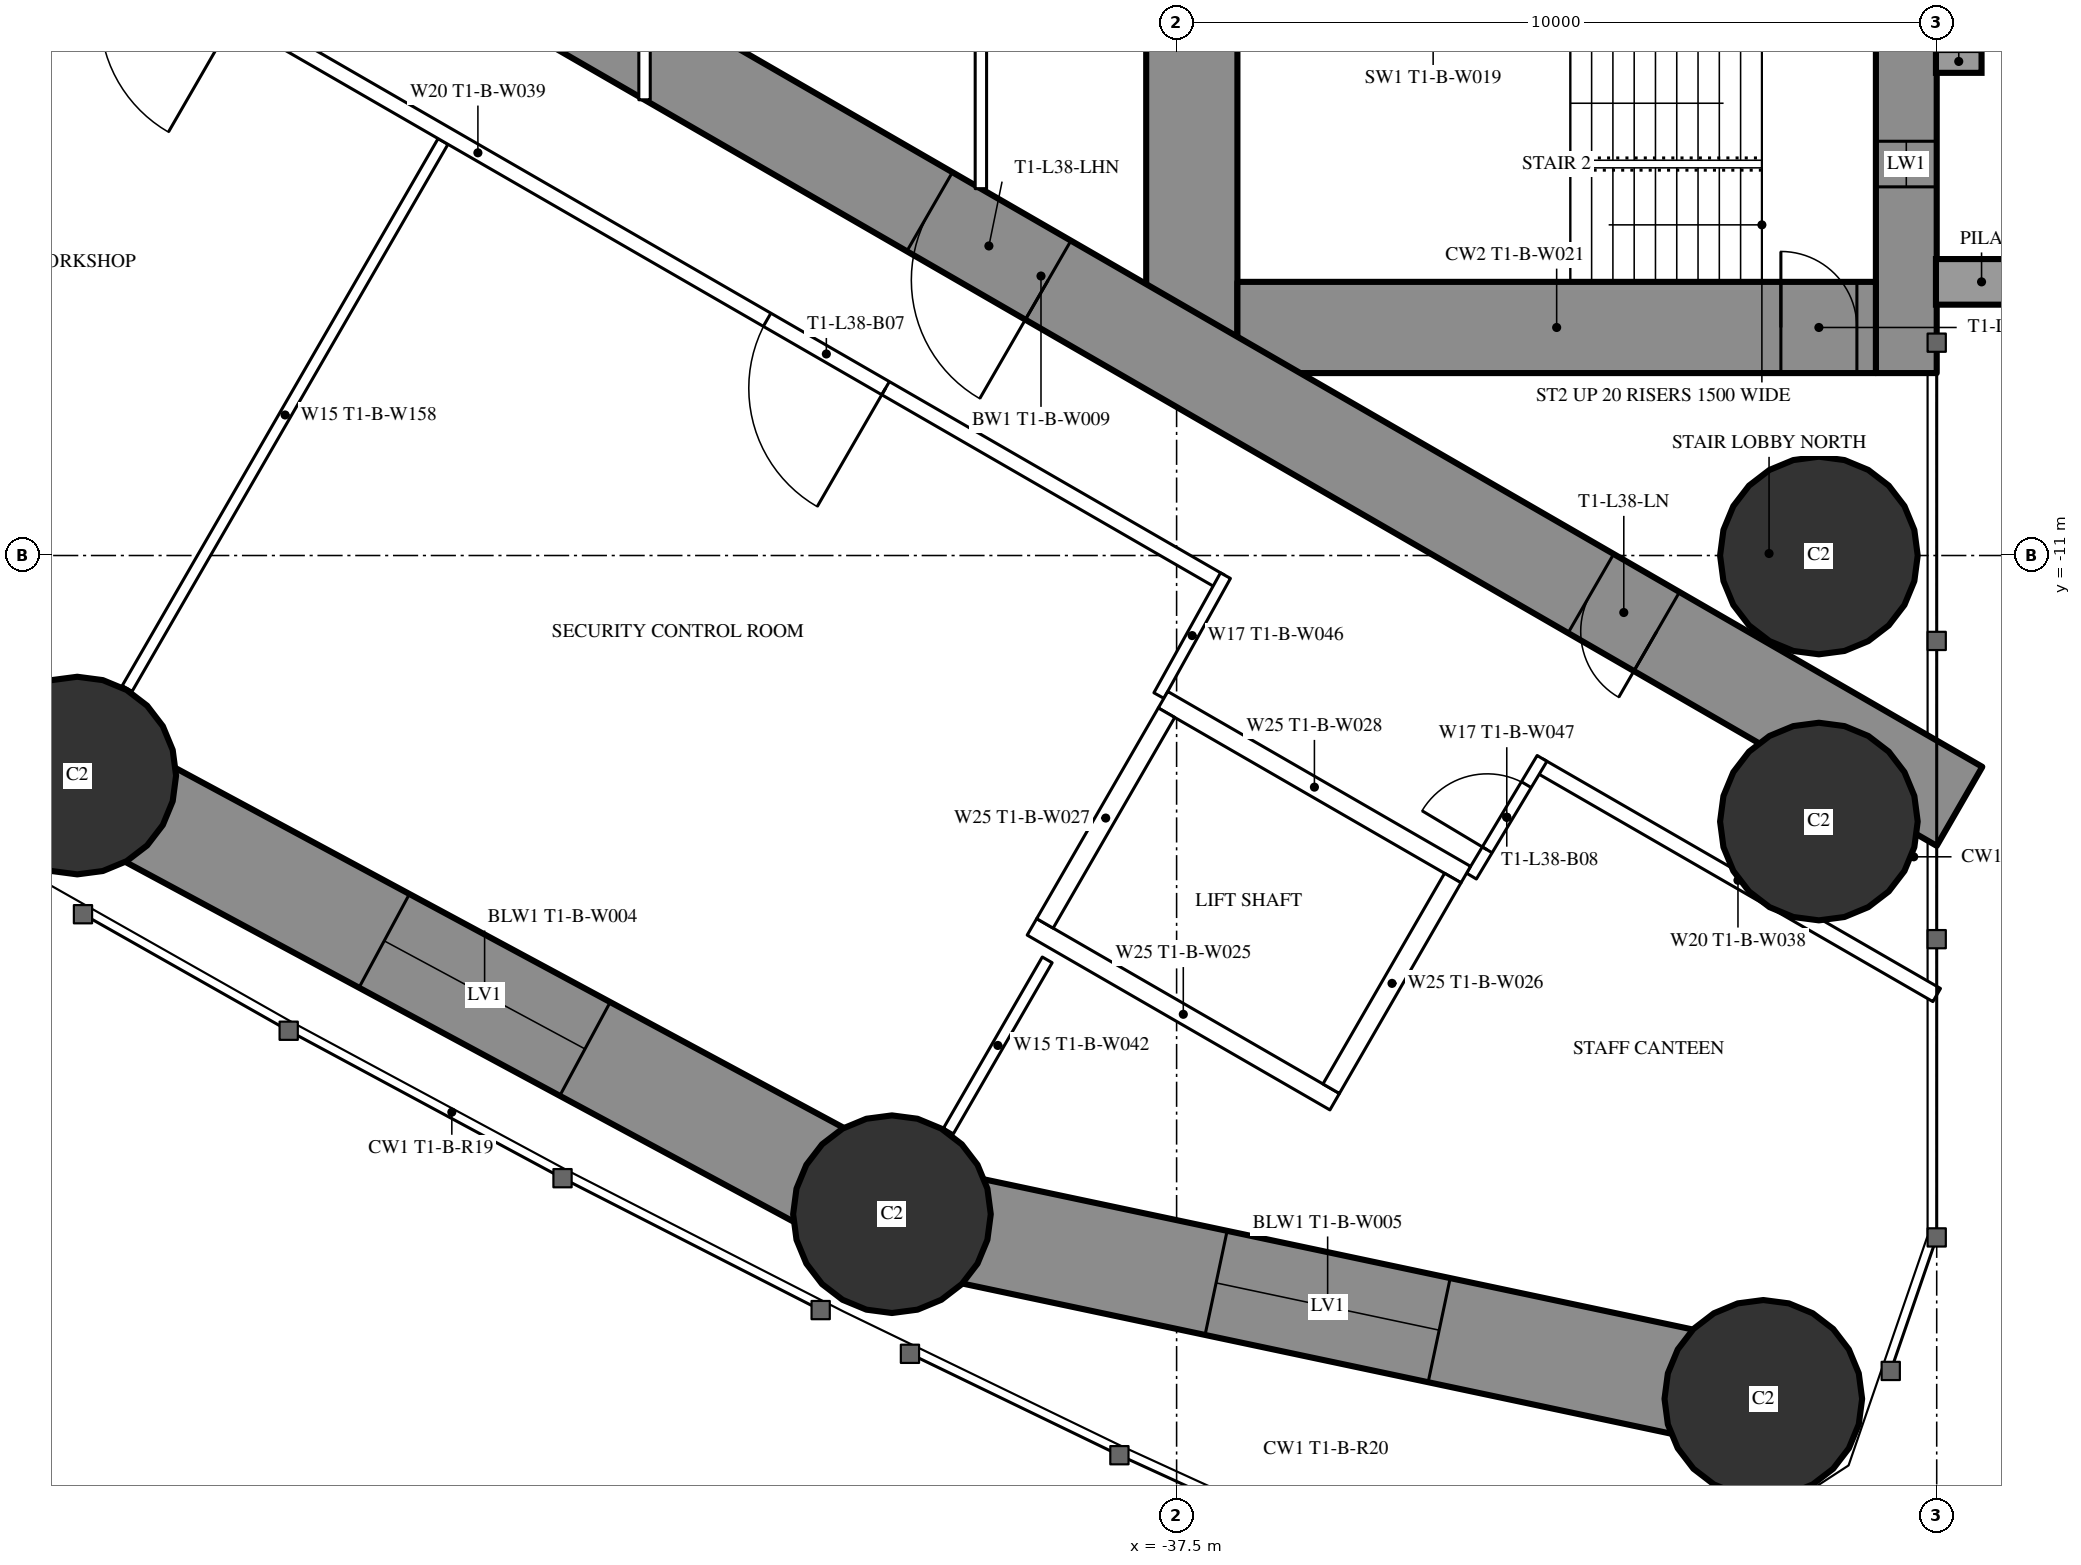
"""IFC4 building model, lengths in metres.
Left out: names, types, materials, properties, quantities, classifications, styles, units other than length and angle.
Written with IfcOpenShell. Run it as: python <this file> out.ifc"""

import sys

from ifc_helpers import new_model, si_unit, direction, frame, frame_2d, origin, origin_2d, place, context, subcontext, project, spatial, rectangle, hollow_circle, extrude, element, fill, save


model = new_model("IFC4")
c1 = context("Model", 3, precision=1e-05, world=origin(), true_north=direction((0.0, 1.0)))
c2 = subcontext(c1, "Body", "Model", "MODEL_VIEW")
j1 = project(units=[si_unit("LENGTHUNIT", "METRE"), si_unit("PLANEANGLEUNIT", "RADIAN")], contexts=[c1])
p1 = place(None, origin())
s1 = spatial("IfcSite", under=j1, at=p1, CompositionType="ELEMENT")
p2 = place(p1, origin())
s2 = spatial("IfcBuilding", under=s1, at=p2, CompositionType="ELEMENT")
p3 = place(p2, frame((0.0, 0.0, 143.1)))
s3 = spatial("IfcBuildingStorey", under=s2, at=p3, CompositionType="ELEMENT", Elevation=143.1)
for number, where, z_axis, x_axis in (
    (1, (-29.781, -22.095, 0.0), (0.0, 0.0, 1.0), (1.0, 0.0, 0.0)),
    (2, (-29.05, -11.0, 0.0), (0.0, 0.0, 1.0), (1.0, 0.0, 0.0)),
    (3, (-29.05, -14.5, 0.0), (0.0, 0.0, 1.0), (1.0, 0.0, 0.0)),
    (4, (-51.963, -13.895, 0.0), (0.0, 0.0, 1.0), (1.0, 0.0, 0.0)),
    (5, (-41.245, -19.666, 0.0), (0.0, 0.0, 1.0), (1.0, 0.0, 0.0)),
):
    element("IfcColumn", number, at=place(p3, frame(where, z_axis=z_axis, x_axis=x_axis)), inside=s3, PredefinedType="COLUMN", context=c2, shape_type="SweptSolid", body=[
        extrude(hollow_circle(Radius=1.3, WallThickness=0.1, at=origin_2d()), origin(), (0.0, 0.0, 1.0), 3.6),
    ])
p4 = place(p3, frame((-27.9, 8.6, 0.0), z_axis=(0.0, 0.0, 1.0), x_axis=(0.0, -1.0, 0.0)))
e6 = element("IfcWall", 6, at=p4, inside=s3, PredefinedType="SHEAR", context=c2, shape_type="SweptSolid", body=[
    extrude(rectangle(XDim=17.2, YDim=0.8, at=frame_2d((8.6, 0.0))), origin(), (0.0, 0.0, 1.0), 3.6),
])
p5 = place(p4, frame((2.45, 0.0, 0.6)))
e7 = element("IfcOpeningElement", 7, at=p5, cuts=e6, PredefinedType="OPENING", context=c2, shape_type="SweptSolid", body=[
    extrude(rectangle(XDim=0.6, YDim=2.1, at=frame_2d((0.3, 1.05))), frame((0.0, 0.41, 0.0), z_axis=(0.0, -1.0, 0.0), x_axis=(1.0, 0.0, 0.0)), (0.0, 0.0, 1.0), 0.82),
])
p6 = place(p4, frame((14.15, 0.0, 0.6)))
e8 = element("IfcOpeningElement", 8, at=p6, cuts=e6, PredefinedType="OPENING", context=c2, shape_type="SweptSolid", body=[
    extrude(rectangle(XDim=0.6, YDim=2.1, at=frame_2d((0.3, 1.05))), frame((0.0, 0.41, 0.0), z_axis=(0.0, -1.0, 0.0), x_axis=(1.0, 0.0, 0.0)), (0.0, 0.0, 1.0), 0.82),
])
p7 = place(p3, frame((-37.3, 8.6, 0.0), z_axis=(0.0, 0.0, 1.0), x_axis=(0.0, -1.0, 0.0)))
e9 = element("IfcWall", 9, at=p7, inside=s3, PredefinedType="SHEAR", context=c2, shape_type="SweptSolid", body=[
    extrude(rectangle(XDim=17.2, YDim=1.2, at=frame_2d((8.6, 0.0))), origin(), (0.0, 0.0, 1.0), 3.6),
])
p8 = place(p7, frame((7.7, 0.0, 0.0)))
e10 = element("IfcOpeningElement", 10, at=p8, cuts=e9, PredefinedType="OPENING", context=c2, shape_type="SweptSolid", body=[
    extrude(rectangle(XDim=1.8, YDim=2.2, at=frame_2d((0.9, 1.1))), frame((0.0, 0.61, 0.0), z_axis=(0.0, -1.0, 0.0), x_axis=(1.0, 0.0, 0.0)), (0.0, 0.0, 1.0), 1.22),
])
p9 = place(p3, frame((-28.3, -8.0, 0.0), z_axis=(0.0, 0.0, 1.0), x_axis=(-1.0, 0.0, 0.0)))
e11 = element("IfcWall", 11, at=p9, inside=s3, PredefinedType="SHEAR", context=c2, shape_type="SweptSolid", body=[
    extrude(rectangle(XDim=8.4, YDim=1.2, at=frame_2d((4.2, 0.0))), origin(), (0.0, 0.0, 1.0), 3.6),
])
p10 = place(p9, frame((0.25, 0.0, 0.0)))
e12 = element("IfcOpeningElement", 12, at=p10, cuts=e11, PredefinedType="OPENING", context=c2, shape_type="SweptSolid", body=[
    extrude(rectangle(XDim=1.0, YDim=2.2, at=frame_2d((0.5, 1.1))), frame((0.0, 0.61, 0.0), z_axis=(0.0, -1.0, 0.0), x_axis=(1.0, 0.0, 0.0)), (0.0, 0.0, 1.0), 1.22),
])
p11 = place(p3, frame((-27.2, -14.3, 0.0), z_axis=(0.0, 0.0, 1.0), x_axis=(-0.866024021859, 0.500002393557, 0.0)))
e13 = element("IfcWall", 13, at=p11, inside=s3, PredefinedType="SHEAR", context=c2, shape_type="SweptSolid", body=[
    extrude(rectangle(XDim=27.907, YDim=1.2, at=frame_2d((13.954, 0.0))), origin(), (0.0, 0.0, 1.0), 3.6),
])
p12 = place(p11, frame((4.6, 0.0, 0.0)))
e14 = element("IfcOpeningElement", 14, at=p12, cuts=e13, PredefinedType="OPENING", context=c2, shape_type="SweptSolid", body=[
    extrude(rectangle(XDim=1.0, YDim=2.2, at=frame_2d((0.5, 1.1))), frame((0.0, 0.61, 0.0), z_axis=(0.0, -1.0, 0.0), x_axis=(1.0, 0.0, 0.0)), (0.0, 0.0, 1.0), 1.22),
])
p13 = place(p11, frame((13.845, 0.0, 0.0)))
e15 = element("IfcOpeningElement", 15, at=p13, cuts=e13, PredefinedType="OPENING", context=c2, shape_type="SweptSolid", body=[
    extrude(rectangle(XDim=1.8, YDim=2.2, at=frame_2d((0.9, 1.1))), frame((0.0, 0.61, 0.0), z_axis=(0.0, -1.0, 0.0), x_axis=(1.0, 0.0, 0.0)), (0.0, 0.0, 1.0), 1.22),
])
p14 = place(p3, frame((-62.287, -7.445, 0.0), z_axis=(0.0, 0.0, 1.0), x_axis=(0.848062521637, -0.529896177939, 0.0)))
e16 = element("IfcWall", 16, at=p14, inside=s3, PredefinedType="SHEAR", context=c2, shape_type="SweptSolid", body=[
    extrude(rectangle(XDim=12.173, YDim=1.4, at=frame_2d((6.086, 0.0))), origin(), (0.0, 0.0, 1.0), 3.6),
])
p15 = place(p14, frame((4.586, 0.0, 0.6)))
e17 = element("IfcOpeningElement", 17, at=p15, cuts=e16, PredefinedType="OPENING", context=c2, shape_type="SweptSolid", body=[
    extrude(rectangle(XDim=3.0, YDim=1.2, at=frame_2d((1.5, 0.6))), frame((0.0, 0.71, 0.0), z_axis=(0.0, -1.0, 0.0), x_axis=(1.0, 0.0, 0.0)), (0.0, 0.0, 1.0), 1.42),
])
p16 = place(p3, frame((-51.963, -13.895, 0.0), z_axis=(0.0, 0.0, 1.0), x_axis=(0.880492350889, -0.474060354835, 0.0)))
e18 = element("IfcWall", 18, at=p16, inside=s3, PredefinedType="SHEAR", context=c2, shape_type="SweptSolid", body=[
    extrude(rectangle(XDim=12.173, YDim=1.4, at=frame_2d((6.086, 0.0))), origin(), (0.0, 0.0, 1.0), 3.6),
])
p17 = place(p16, frame((4.586, 0.0, 0.6)))
e19 = element("IfcOpeningElement", 19, at=p17, cuts=e18, PredefinedType="OPENING", context=c2, shape_type="SweptSolid", body=[
    extrude(rectangle(XDim=3.0, YDim=1.2, at=frame_2d((1.5, 0.6))), frame((0.0, 0.71, 0.0), z_axis=(0.0, -1.0, 0.0), x_axis=(1.0, 0.0, 0.0)), (0.0, 0.0, 1.0), 1.42),
])
p18 = place(p3, frame((-41.245, -19.666, 0.0), z_axis=(0.0, 0.0, 1.0), x_axis=(0.978282156247, -0.207277646573, 0.0)))
e20 = element("IfcWall", 20, at=p18, inside=s3, PredefinedType="SHEAR", context=c2, shape_type="SweptSolid", body=[
    extrude(rectangle(XDim=11.718, YDim=1.4, at=frame_2d((5.859, 0.0))), origin(), (0.0, 0.0, 1.0), 3.6),
])
p19 = place(p18, frame((4.359, 0.0, 0.6)))
e21 = element("IfcOpeningElement", 21, at=p19, cuts=e20, PredefinedType="OPENING", context=c2, shape_type="SweptSolid", body=[
    extrude(rectangle(XDim=3.0, YDim=1.2, at=frame_2d((1.5, 0.6))), frame((0.0, 0.71, 0.0), z_axis=(0.0, -1.0, 0.0), x_axis=(1.0, 0.0, 0.0)), (0.0, 0.0, 1.0), 1.42),
])
p20 = place(p3, frame((-47.151, -5.552, 0.0), z_axis=(0.0, 0.0, 1.0), x_axis=(-0.500003012045, -0.866023664773, 0.0)))
e22 = element("IfcWall", 22, at=p20, inside=s3, PredefinedType="PARTITIONING", context=c2, shape_type="SweptSolid", body=[
    extrude(rectangle(XDim=8.311, YDim=0.15, at=frame_2d((4.156, 0.0))), origin(), (0.0, 0.0, 1.0), 2.15),
])
p21 = place(p3, frame((-39.202, -16.32, 0.0), z_axis=(0.0, 0.0, 1.0), x_axis=(-0.49997716683, -0.86603858612, 0.0)))
e23 = element("IfcWall", 23, at=p21, inside=s3, PredefinedType="PARTITIONING", context=c2, shape_type="SweptSolid", body=[
    extrude(rectangle(XDim=2.6, YDim=0.15, at=frame_2d((1.3, 0.0))), origin(), (0.0, 0.0, 1.0), 3.35),
])
p22 = place(p3, frame((-27.5, -16.782, 0.0), z_axis=(0.0, 0.0, 1.0), x_axis=(-0.866030050624, 0.499991951352, 0.0)))
e24 = element("IfcWall", 24, at=p22, inside=s3, PredefinedType="PARTITIONING", context=c2, shape_type="SweptSolid", body=[
    extrude(rectangle(XDim=6.038, YDim=0.2, at=frame_2d((3.019, 0.0))), origin(), (0.0, 0.0, 1.0), 3.35),
])
p23 = place(p3, frame((-36.92, -11.344, 0.0), z_axis=(0.0, 0.0, 1.0), x_axis=(-0.866028313256, 0.499994960614, 0.0)))
e25 = element("IfcWall", 25, at=p23, inside=s3, PredefinedType="PARTITIONING", context=c2, shape_type="SweptSolid", body=[
    extrude(rectangle(XDim=22.568, YDim=0.2, at=frame_2d((11.284, 0.0))), origin(), (0.0, 0.0, 1.0), 3.35),
])
p24 = place(p23, frame((20.24, 0.0, 0.0)))
e26 = element("IfcOpeningElement", 26, at=p24, cuts=e25, PredefinedType="OPENING", context=c2, shape_type="SweptSolid", body=[
    extrude(rectangle(XDim=1.8, YDim=2.14, at=frame_2d((0.9, 1.07))), frame((0.0, 0.11, 0.0), z_axis=(0.0, -1.0, 0.0), x_axis=(1.0, 0.0, 0.0)), (0.0, 0.0, 1.0), 0.22),
])
p25 = place(p23, frame((14.946, 0.0, 0.0)))
e27 = element("IfcOpeningElement", 27, at=p25, cuts=e25, PredefinedType="OPENING", context=c2, shape_type="SweptSolid", body=[
    extrude(rectangle(XDim=1.8, YDim=2.2, at=frame_2d((0.9, 1.1))), frame((0.0, 0.11, 0.0), z_axis=(0.0, -1.0, 0.0), x_axis=(1.0, 0.0, 0.0)), (0.0, 0.0, 1.0), 0.22),
])
p26 = place(p23, frame((5.091, 0.0, 0.0)))
e28 = element("IfcOpeningElement", 28, at=p26, cuts=e25, PredefinedType="OPENING", context=c2, shape_type="SweptSolid", body=[
    extrude(rectangle(XDim=1.8, YDim=2.2, at=frame_2d((0.9, 1.1))), frame((0.0, 0.11, 0.0), z_axis=(0.0, -1.0, 0.0), x_axis=(1.0, 0.0, 0.0)), (0.0, 0.0, 1.0), 0.22),
])
p27 = place(p3, frame((-36.857, -11.265, 0.0), z_axis=(0.0, 0.0, 1.0), x_axis=(-0.485482130951, -0.874246590229, 0.0)))
e29 = element("IfcWall", 29, at=p27, inside=s3, PredefinedType="PARTITIONING", context=c2, shape_type="SweptSolid", body=[
    extrude(rectangle(XDim=1.805, YDim=0.15, at=frame_2d((0.902, 0.0))), origin(), (0.0, 0.0, 1.0), 3.35),
])
p28 = place(p3, frame((-33.621, -15.218, 0.0), z_axis=(0.0, 0.0, 1.0), x_axis=(0.514336634837, 0.857588377991, 0.0)))
e30 = element("IfcWall", 30, at=p28, inside=s3, PredefinedType="PARTITIONING", context=c2, shape_type="SweptSolid", body=[
    extrude(rectangle(XDim=1.805, YDim=0.15, at=frame_2d((0.903, 0.0))), origin(), (0.0, 0.0, 1.0), 3.35),
])
p29 = place(p28, frame((0.403, 0.0, 0.0)))
e31 = element("IfcOpeningElement", 31, at=p29, cuts=e30, PredefinedType="OPENING", context=c2, shape_type="SweptSolid", body=[
    extrude(rectangle(XDim=1.0, YDim=2.14, at=frame_2d((0.5, 1.07))), frame((0.0, 0.085, 0.0), z_axis=(0.0, -1.0, 0.0), x_axis=(1.0, 0.0, 0.0)), (0.0, 0.0, 1.0), 0.17),
])
p30 = place(p3, frame((-40.075, 1.2, 0.0), z_axis=(0.0, 0.0, 1.0), x_axis=(0.0, -1.0, 0.0)))
e32 = element("IfcWall", 32, at=p30, inside=s3, PredefinedType="PARTITIONING", context=c2, shape_type="SweptSolid", body=[
    extrude(rectangle(XDim=7.374, YDim=0.15, at=frame_2d((3.687, 0.0))), origin(), (0.0, 0.0, 1.0), 3.35),
])
p31 = place(p30, frame((2.787, 0.0, 0.0)))
e33 = element("IfcOpeningElement", 33, at=p31, cuts=e32, PredefinedType="OPENING", context=c2, shape_type="SweptSolid", body=[
    extrude(rectangle(XDim=1.8, YDim=2.2, at=frame_2d((0.9, 1.1))), frame((0.0, 0.085, 0.0), z_axis=(0.0, -1.0, 0.0), x_axis=(1.0, 0.0, 0.0)), (0.0, 0.0, 1.0), 0.17),
])
p32 = place(p3, frame((-44.5, 4.169, 0.0), z_axis=(0.0, 0.0, 1.0), x_axis=(0.0, -1.0, 0.0)))
e34 = element("IfcWall", 34, at=p32, inside=s3, PredefinedType="PARTITIONING", context=c2, shape_type="SweptSolid", body=[
    extrude(rectangle(XDim=9.173, YDim=0.15, at=frame_2d((4.587, 0.0))), origin(), (0.0, 0.0, 1.0), 3.35),
])
p33 = place(p32, frame((1.167, 0.0, 0.0)))
e35 = element("IfcOpeningElement", 35, at=p33, cuts=e34, PredefinedType="OPENING", context=c2, shape_type="SweptSolid", body=[
    extrude(rectangle(XDim=1.0, YDim=2.2, at=frame_2d((0.5, 1.1))), frame((0.0, 0.085, 0.0), z_axis=(0.0, -1.0, 0.0), x_axis=(1.0, 0.0, 0.0)), (0.0, 0.0, 1.0), 0.17),
])
p34 = place(p32, frame((6.171, 0.0, 0.0)))
e36 = element("IfcOpeningElement", 36, at=p34, cuts=e34, PredefinedType="OPENING", context=c2, shape_type="SweptSolid", body=[
    extrude(rectangle(XDim=1.0, YDim=2.2, at=frame_2d((0.5, 1.1))), frame((0.0, 0.085, 0.0), z_axis=(0.0, -1.0, 0.0), x_axis=(1.0, 0.0, 0.0)), (0.0, 0.0, 1.0), 0.17),
])
p35 = place(p3, frame((-33.696, -15.197, 0.0), z_axis=(0.0, 0.0, 1.0), x_axis=(-0.865976953817, 0.500083908417, 0.0)))
e37 = element("IfcWall", 37, at=p35, inside=s3, PredefinedType="PARTITIONING", context=c2, shape_type="SweptSolid", body=[
    extrude(rectangle(XDim=4.599, YDim=0.25, at=frame_2d((2.3, 0.0))), origin(), (0.0, 0.0, 1.0), 3.35),
])
p36 = place(p3, frame((-35.42, -18.186, 0.0), z_axis=(0.0, 0.0, 1.0), x_axis=(-0.865990227814, 0.50006092162, 0.0)))
e38 = element("IfcWall", 38, at=p36, inside=s3, PredefinedType="PARTITIONING", context=c2, shape_type="SweptSolid", body=[
    extrude(rectangle(XDim=4.6, YDim=0.25, at=frame_2d((2.3, 0.0))), origin(), (0.0, 0.0, 1.0), 3.35),
])
p37 = place(p3, frame((-33.866, -15.243, 0.0), z_axis=(0.0, 0.0, 1.0), x_axis=(-0.499929347863, -0.866066190972, 0.0)))
e39 = element("IfcWall", 39, at=p37, inside=s3, PredefinedType="PARTITIONING", context=c2, shape_type="SweptSolid", body=[
    extrude(rectangle(XDim=3.201, YDim=0.25, at=frame_2d((1.6, 0.0))), origin(), (0.0, 0.0, 1.0), 3.35),
])
p38 = place(p3, frame((-37.633, -13.068, 0.0), z_axis=(0.0, 0.0, 1.0), x_axis=(-0.499872130319, -0.866099216793, 0.0)))
e40 = element("IfcWall", 40, at=p38, inside=s3, PredefinedType="PARTITIONING", context=c2, shape_type="SweptSolid", body=[
    extrude(rectangle(XDim=3.2, YDim=0.25, at=frame_2d((1.6, 0.0))), origin(), (0.0, 0.0, 1.0), 3.35),
])
p39 = place(p17, origin())
e41 = element("IfcWindow", 41, at=p39, inside=s3, PartitioningType="SINGLE_PANEL", PredefinedType="WINDOW", context=c2, shape_type="SweptSolid", body=[
    extrude(rectangle(XDim=3.0, YDim=1.2, at=frame_2d((1.5, 0.6))), frame((0.0, 0.03, 0.0), z_axis=(0.0, -1.0, 0.0), x_axis=(1.0, 0.0, 0.0)), (0.0, 0.0, 1.0), 0.06),
])
fill(e19, e41)
p40 = place(p19, origin())
e42 = element("IfcWindow", 42, at=p40, inside=s3, PartitioningType="SINGLE_PANEL", PredefinedType="WINDOW", context=c2, shape_type="SweptSolid", body=[
    extrude(rectangle(XDim=3.0, YDim=1.2, at=frame_2d((1.5, 0.6))), frame((0.0, 0.03, 0.0), z_axis=(0.0, -1.0, 0.0), x_axis=(1.0, 0.0, 0.0)), (0.0, 0.0, 1.0), 0.06),
])
fill(e21, e42)
p41 = place(p26, origin())
e43 = element("IfcDoor", 43, at=p41, inside=s3, OperationType="DOUBLE_DOOR_SINGLE_SWING", PredefinedType="DOOR", context=c2, shape_type="SweptSolid", body=[
    extrude(rectangle(XDim=1.8, YDim=2.2, at=frame_2d((0.9, 1.1))), frame((0.0, 0.025, 0.0), z_axis=(0.0, -1.0, 0.0), x_axis=(1.0, 0.0, 0.0)), (0.0, 0.0, 1.0), 0.05),
])
fill(e28, e43)
p42 = place(p29, origin())
e44 = element("IfcDoor", 44, at=p42, inside=s3, OperationType="SINGLE_SWING_LEFT", PredefinedType="DOOR", context=c2, shape_type="SweptSolid", body=[
    extrude(rectangle(XDim=1.0, YDim=2.14, at=frame_2d((0.5, 1.07))), frame((0.0, 0.025, 0.0), z_axis=(0.0, -1.0, 0.0), x_axis=(1.0, 0.0, 0.0)), (0.0, 0.0, 1.0), 0.05),
])
fill(e31, e44)
p43 = place(p12, origin())
e45 = element("IfcDoor", 45, at=p43, inside=s3, OperationType="SINGLE_SWING_LEFT", PredefinedType="DOOR", context=c2, shape_type="SweptSolid", body=[
    extrude(rectangle(XDim=1.0, YDim=2.2, at=frame_2d((0.5, 1.1))), frame((0.0, 0.025, 0.0), z_axis=(0.0, -1.0, 0.0), x_axis=(1.0, 0.0, 0.0)), (0.0, 0.0, 1.0), 0.05),
])
fill(e14, e45)
p44 = place(p13, origin())
e46 = element("IfcDoor", 46, at=p44, inside=s3, OperationType="DOUBLE_DOOR_SINGLE_SWING", PredefinedType="DOOR", context=c2, shape_type="SweptSolid", body=[
    extrude(rectangle(XDim=1.8, YDim=2.2, at=frame_2d((0.9, 1.1))), frame((0.0, 0.025, 0.0), z_axis=(0.0, -1.0, 0.0), x_axis=(1.0, 0.0, 0.0)), (0.0, 0.0, 1.0), 0.05),
])
fill(e15, e46)
p45 = place(p10, origin())
e47 = element("IfcDoor", 47, at=p45, inside=s3, OperationType="SINGLE_SWING_RIGHT", PredefinedType="DOOR", context=c2, shape_type="SweptSolid", body=[
    extrude(rectangle(XDim=1.0, YDim=2.2, at=frame_2d((0.5, 1.1))), frame((0.0, 0.025, 0.0), z_axis=(0.0, -1.0, 0.0), x_axis=(1.0, 0.0, 0.0)), (0.0, 0.0, 1.0), 0.05),
])
fill(e12, e47)
p46 = place(p6, origin())
e48 = element("IfcWindow", 48, at=p46, inside=s3, PartitioningType="SINGLE_PANEL", PredefinedType="WINDOW", context=c2, shape_type="SweptSolid", body=[
    extrude(rectangle(XDim=0.6, YDim=2.1, at=frame_2d((0.3, 1.05))), frame((0.0, 0.03, 0.0), z_axis=(0.0, -1.0, 0.0), x_axis=(1.0, 0.0, 0.0)), (0.0, 0.0, 1.0), 0.06),
])
fill(e8, e48)
save(model, sys.argv[1])
